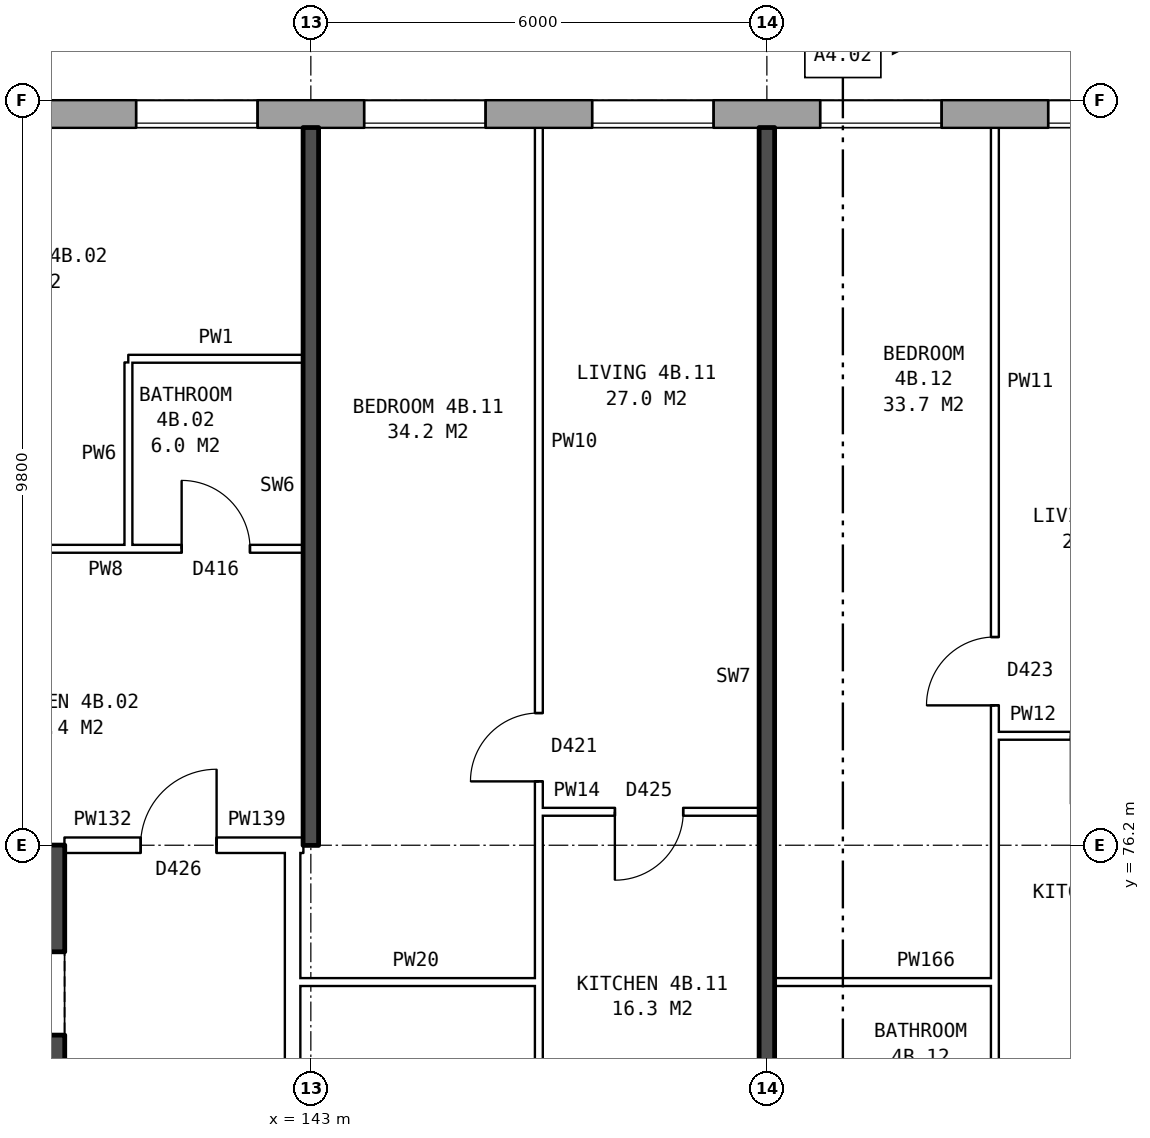
"""IFC4 building model, lengths in metres.
Left out: names, types, materials, properties, quantities, classifications, styles, units other than length and angle.
Written with IfcOpenShell. Run it as: python <this file> out.ifc"""

import sys

from ifc_helpers import new_model, si_unit, direction, frame, frame_2d, origin, place, context, subcontext, project, spatial, rectangle, extrude, element, fill, save


model = new_model("IFC4")
c1 = context("Model", 3, precision=1e-05, world=origin(), true_north=direction((0.0, 1.0)))
c2 = subcontext(c1, "Body", "Model", "MODEL_VIEW")
j1 = project(units=[si_unit("LENGTHUNIT", "METRE"), si_unit("PLANEANGLEUNIT", "RADIAN")], contexts=[c1])
p1 = place(None, origin())
s1 = spatial("IfcSite", under=j1, at=p1, CompositionType="ELEMENT")
p2 = place(p1, origin())
s2 = spatial("IfcBuilding", under=s1, at=p2, CompositionType="ELEMENT")
p3 = place(p2, frame((0.0, 0.0, 19.5)))
s3 = spatial("IfcBuildingStorey", under=s2, at=p3, CompositionType="ELEMENT", Elevation=19.5)
p4 = place(p3, frame((174.675, 85.82, 0.0), z_axis=(0.0, 0.0, 1.0), x_axis=(-1.0, 0.0, 0.0)))
e1 = element("IfcWall", 1, at=p4, inside=s3, PredefinedType="STANDARD", context=c2, shape_type="SweptSolid", body=[
    extrude(rectangle(XDim=40.601, YDim=0.36, at=frame_2d((20.3, 0.0))), origin(), (0.0, 0.0, 1.0), 2.85),
])
p5 = place(p4, frame((2.375, 0.0, 0.8)))
e2 = element("IfcOpeningElement", 2, at=p5, cuts=e1, PredefinedType="OPENING", context=c2, shape_type="SweptSolid", body=[
    extrude(rectangle(XDim=1.6, YDim=1.8, at=frame_2d((0.8, 0.9))), frame((0.0, 0.19, 0.0), z_axis=(0.0, -1.0, 0.0), x_axis=(1.0, 0.0, 0.0)), (0.0, 0.0, 1.0), 0.38),
])
p6 = place(p4, frame((5.375, 0.0, 0.8)))
e3 = element("IfcOpeningElement", 3, at=p6, cuts=e1, PredefinedType="OPENING", context=c2, shape_type="SweptSolid", body=[
    extrude(rectangle(XDim=1.6, YDim=1.8, at=frame_2d((0.8, 0.9))), frame((0.0, 0.19, 0.0), z_axis=(0.0, -1.0, 0.0), x_axis=(1.0, 0.0, 0.0)), (0.0, 0.0, 1.0), 0.38),
])
p7 = place(p4, frame((8.375, 0.0, 0.8)))
e4 = element("IfcOpeningElement", 4, at=p7, cuts=e1, PredefinedType="OPENING", context=c2, shape_type="SweptSolid", body=[
    extrude(rectangle(XDim=1.6, YDim=1.8, at=frame_2d((0.8, 0.9))), frame((0.0, 0.19, 0.0), z_axis=(0.0, -1.0, 0.0), x_axis=(1.0, 0.0, 0.0)), (0.0, 0.0, 1.0), 0.38),
])
p8 = place(p4, frame((11.375, 0.0, 0.8)))
e5 = element("IfcOpeningElement", 5, at=p8, cuts=e1, PredefinedType="OPENING", context=c2, shape_type="SweptSolid", body=[
    extrude(rectangle(XDim=1.6, YDim=1.8, at=frame_2d((0.8, 0.9))), frame((0.0, 0.19, 0.0), z_axis=(0.0, -1.0, 0.0), x_axis=(1.0, 0.0, 0.0)), (0.0, 0.0, 1.0), 0.38),
])
p9 = place(p4, frame((14.375, 0.0, 0.8)))
e6 = element("IfcOpeningElement", 6, at=p9, cuts=e1, PredefinedType="OPENING", context=c2, shape_type="SweptSolid", body=[
    extrude(rectangle(XDim=1.6, YDim=1.8, at=frame_2d((0.8, 0.9))), frame((0.0, 0.19, 0.0), z_axis=(0.0, -1.0, 0.0), x_axis=(1.0, 0.0, 0.0)), (0.0, 0.0, 1.0), 0.38),
])
p10 = place(p4, frame((17.375, 0.0, 0.8)))
e7 = element("IfcOpeningElement", 7, at=p10, cuts=e1, PredefinedType="OPENING", context=c2, shape_type="SweptSolid", body=[
    extrude(rectangle(XDim=1.6, YDim=1.8, at=frame_2d((0.8, 0.9))), frame((0.0, 0.19, 0.0), z_axis=(0.0, -1.0, 0.0), x_axis=(1.0, 0.0, 0.0)), (0.0, 0.0, 1.0), 0.38),
])
p11 = place(p4, frame((20.375, 0.0, 0.8)))
e8 = element("IfcOpeningElement", 8, at=p11, cuts=e1, PredefinedType="OPENING", context=c2, shape_type="SweptSolid", body=[
    extrude(rectangle(XDim=1.6, YDim=1.8, at=frame_2d((0.8, 0.9))), frame((0.0, 0.19, 0.0), z_axis=(0.0, -1.0, 0.0), x_axis=(1.0, 0.0, 0.0)), (0.0, 0.0, 1.0), 0.38),
])
p12 = place(p4, frame((23.375, 0.0, 0.8)))
e9 = element("IfcOpeningElement", 9, at=p12, cuts=e1, PredefinedType="OPENING", context=c2, shape_type="SweptSolid", body=[
    extrude(rectangle(XDim=1.6, YDim=1.8, at=frame_2d((0.8, 0.9))), frame((0.0, 0.19, 0.0), z_axis=(0.0, -1.0, 0.0), x_axis=(1.0, 0.0, 0.0)), (0.0, 0.0, 1.0), 0.38),
])
p13 = place(p4, frame((26.375, 0.0, 0.8)))
e10 = element("IfcOpeningElement", 10, at=p13, cuts=e1, PredefinedType="OPENING", context=c2, shape_type="SweptSolid", body=[
    extrude(rectangle(XDim=1.6, YDim=1.8, at=frame_2d((0.8, 0.9))), frame((0.0, 0.19, 0.0), z_axis=(0.0, -1.0, 0.0), x_axis=(1.0, 0.0, 0.0)), (0.0, 0.0, 1.0), 0.38),
])
p14 = place(p4, frame((29.375, 0.0, 0.8)))
e11 = element("IfcOpeningElement", 11, at=p14, cuts=e1, PredefinedType="OPENING", context=c2, shape_type="SweptSolid", body=[
    extrude(rectangle(XDim=1.6, YDim=1.8, at=frame_2d((0.8, 0.9))), frame((0.0, 0.19, 0.0), z_axis=(0.0, -1.0, 0.0), x_axis=(1.0, 0.0, 0.0)), (0.0, 0.0, 1.0), 0.38),
])
p15 = place(p4, frame((32.375, 0.0, 0.8)))
e12 = element("IfcOpeningElement", 12, at=p15, cuts=e1, PredefinedType="OPENING", context=c2, shape_type="SweptSolid", body=[
    extrude(rectangle(XDim=1.6, YDim=1.8, at=frame_2d((0.8, 0.9))), frame((0.0, 0.19, 0.0), z_axis=(0.0, -1.0, 0.0), x_axis=(1.0, 0.0, 0.0)), (0.0, 0.0, 1.0), 0.38),
])
p16 = place(p4, frame((35.375, 0.0, 0.8)))
e13 = element("IfcOpeningElement", 13, at=p16, cuts=e1, PredefinedType="OPENING", context=c2, shape_type="SweptSolid", body=[
    extrude(rectangle(XDim=1.6, YDim=1.8, at=frame_2d((0.8, 0.9))), frame((0.0, 0.19, 0.0), z_axis=(0.0, -1.0, 0.0), x_axis=(1.0, 0.0, 0.0)), (0.0, 0.0, 1.0), 0.38),
])
p17 = place(p4, frame((37.875, 0.0, 0.8)))
e14 = element("IfcOpeningElement", 14, at=p17, cuts=e1, PredefinedType="OPENING", context=c2, shape_type="SweptSolid", body=[
    extrude(rectangle(XDim=1.2, YDim=1.8, at=frame_2d((0.6, 0.9))), frame((0.0, 0.19, 0.0), z_axis=(0.0, -1.0, 0.0), x_axis=(1.0, 0.0, 0.0)), (0.0, 0.0, 1.0), 0.38),
])
p18 = place(p4, frame((39.375, 0.0, 0.8)))
e15 = element("IfcOpeningElement", 15, at=p18, cuts=e1, PredefinedType="OPENING", context=c2, shape_type="SweptSolid", body=[
    extrude(rectangle(XDim=0.6, YDim=1.2, at=frame_2d((0.3, 0.6))), frame((0.0, 0.19, 0.0), z_axis=(0.0, -1.0, 0.0), x_axis=(1.0, 0.0, 0.0)), (0.0, 0.0, 1.0), 0.38),
])
p19 = place(p3, frame((139.31, 64.7, 0.0), z_axis=(0.0, 0.0, 1.0), x_axis=(0.0, 1.0, 0.0)))
e16 = element("IfcWall", 16, at=p19, inside=s3, PredefinedType="SHEAR", context=c2, shape_type="SweptSolid", body=[
    extrude(rectangle(XDim=10.6, YDim=0.9, at=frame_2d((5.3, 0.0))), origin(), (0.0, 0.0, 1.0), 2.85),
])
p20 = place(p19, frame((0.425, 0.0, 0.0)))
e17 = element("IfcOpeningElement", 17, at=p20, cuts=e16, PredefinedType="OPENING", context=c2, shape_type="SweptSolid", body=[
    extrude(rectangle(XDim=1.1, YDim=2.1, at=frame_2d((0.55, 1.05))), frame((0.0, 0.46, 0.0), z_axis=(0.0, -1.0, 0.0), x_axis=(1.0, 0.0, 0.0)), (0.0, 0.0, 1.0), 0.92),
])
p21 = place(p19, frame((9.0, 0.0, 0.0)))
e18 = element("IfcOpeningElement", 18, at=p21, cuts=e16, PredefinedType="OPENING", context=c2, shape_type="SweptSolid", body=[
    extrude(rectangle(XDim=1.1, YDim=2.1, at=frame_2d((0.55, 1.05))), frame((0.0, 0.46, 0.0), z_axis=(0.0, -1.0, 0.0), x_axis=(1.0, 0.0, 0.0)), (0.0, 0.0, 1.0), 0.92),
])
p22 = place(p19, frame((7.225, 0.0, 0.0)))
e19 = element("IfcOpeningElement", 19, at=p22, cuts=e16, PredefinedType="OPENING", context=c2, shape_type="SweptSolid", body=[
    extrude(rectangle(XDim=0.85, YDim=2.1, at=frame_2d((0.425, 1.05))), frame((0.0, 0.46, 0.0), z_axis=(0.0, -1.0, 0.0), x_axis=(1.0, 0.0, 0.0)), (0.0, 0.0, 1.0), 0.92),
])
p23 = place(p3, frame((139.76, 75.75, 0.0), z_axis=(0.0, 0.0, 1.0), x_axis=(-1.0, 0.0, 0.0)))
e20 = element("IfcWall", 20, at=p23, inside=s3, PredefinedType="SHEAR", context=c2, shape_type="SweptSolid", body=[
    extrude(rectangle(XDim=8.4, YDim=0.9, at=frame_2d((4.2, 0.0))), origin(), (0.0, 0.0, 1.0), 2.85),
])
p24 = place(p3, frame((142.76, 63.9, 0.0), z_axis=(0.0, 0.0, 1.0), x_axis=(0.0, 1.0, 0.0)))
e21 = element("IfcWall", 21, at=p24, inside=s3, PredefinedType="PARTITIONING", context=c2, shape_type="SweptSolid", body=[
    extrude(rectangle(XDim=12.2, YDim=0.2, at=frame_2d((6.1, 0.0))), origin(), (0.0, 0.0, 1.0), 2.85),
])
p25 = place(p24, frame((5.1, 0.0, 0.0)))
e22 = element("IfcOpeningElement", 22, at=p25, cuts=e21, PredefinedType="OPENING", context=c2, shape_type="SweptSolid", body=[
    extrude(rectangle(XDim=2.0, YDim=2.1, at=frame_2d((1.0, 1.05))), frame((0.0, 0.11, 0.0), z_axis=(0.0, -1.0, 0.0), x_axis=(1.0, 0.0, 0.0)), (0.0, 0.0, 1.0), 0.22),
])
p26 = place(p3, frame((142.76, 74.4, 0.0), z_axis=(0.0, 0.0, 1.0), x_axis=(1.0, 0.0, 0.0)))
e23 = element("IfcWall", 23, at=p26, inside=s3, PredefinedType="PARTITIONING", context=c2, shape_type="SweptSolid", body=[
    extrude(rectangle(XDim=3.24, YDim=0.1, at=frame_2d((1.62, 0.0))), origin(), (0.0, 0.0, 1.0), 2.85),
])
p27 = place(p3, frame((149.1, 74.4, 0.0), z_axis=(0.0, 0.0, 1.0), x_axis=(1.0, 0.0, 0.0)))
e24 = element("IfcWall", 24, at=p27, inside=s3, PredefinedType="PARTITIONING", context=c2, shape_type="SweptSolid", body=[
    extrude(rectangle(XDim=2.9, YDim=0.1, at=frame_2d((1.45, 0.0))), origin(), (0.0, 0.0, 1.0), 2.85),
])
p28 = place(p3, frame((139.76, 76.2, 0.0), z_axis=(0.0, 0.0, 1.0), x_axis=(1.0, 0.0, 0.0)))
e25 = element("IfcWall", 25, at=p28, inside=s3, PredefinedType="PARTITIONING", context=c2, shape_type="SweptSolid", body=[
    extrude(rectangle(XDim=3.0, YDim=0.2, at=frame_2d((1.5, 0.0))), origin(), (0.0, 0.0, 1.0), 2.85),
])
p29 = place(p28, frame((1.0, 0.0, 0.0)))
e26 = element("IfcOpeningElement", 26, at=p29, cuts=e25, PredefinedType="OPENING", context=c2, shape_type="SweptSolid", body=[
    extrude(rectangle(XDim=1.0, YDim=2.1, at=frame_2d((0.5, 1.05))), frame((0.0, 0.11, 0.0), z_axis=(0.0, -1.0, 0.0), x_axis=(1.0, 0.0, 0.0)), (0.0, 0.0, 1.0), 0.22),
])
p30 = place(p3, frame((142.76, 76.2, 0.0), z_axis=(0.0, 0.0, 1.0), x_axis=(1.0, 0.0, 0.0)))
e27 = element("IfcWall", 27, at=p30, inside=s3, PredefinedType="PARTITIONING", context=c2, shape_type="SweptSolid", body=[
    extrude(rectangle(XDim=0.14, YDim=0.2, at=frame_2d((0.07, 0.0))), origin(), (0.0, 0.0, 1.0), 2.85),
])
p31 = place(p3, frame((146.0, 76.64, 0.0), z_axis=(0.0, 0.0, 1.0), x_axis=(1.0, 0.0, 0.0)))
e28 = element("IfcWall", 28, at=p31, inside=s3, PredefinedType="PARTITIONING", context=c2, shape_type="SweptSolid", body=[
    extrude(rectangle(XDim=2.9, YDim=0.1, at=frame_2d((1.45, 0.0))), origin(), (0.0, 0.0, 1.0), 2.85),
])
p32 = place(p31, frame((1.0, 0.0, 0.0)))
e29 = element("IfcOpeningElement", 29, at=p32, cuts=e28, PredefinedType="OPENING", context=c2, shape_type="SweptSolid", body=[
    extrude(rectangle(XDim=0.9, YDim=2.1, at=frame_2d((0.45, 1.05))), frame((0.0, 0.06, 0.0), z_axis=(0.0, -1.0, 0.0), x_axis=(1.0, 0.0, 0.0)), (0.0, 0.0, 1.0), 0.12),
])
p33 = place(p3, frame((152.0, 77.64, 0.0), z_axis=(0.0, 0.0, 1.0), x_axis=(1.0, 0.0, 0.0)))
e30 = element("IfcWall", 30, at=p33, inside=s3, PredefinedType="PARTITIONING", context=c2, shape_type="SweptSolid", body=[
    extrude(rectangle(XDim=2.9, YDim=0.1, at=frame_2d((1.45, 0.0))), origin(), (0.0, 0.0, 1.0), 2.85),
])
p34 = place(p33, frame((1.0, 0.0, 0.0)))
e31 = element("IfcOpeningElement", 31, at=p34, cuts=e30, PredefinedType="OPENING", context=c2, shape_type="SweptSolid", body=[
    extrude(rectangle(XDim=0.9, YDim=2.1, at=frame_2d((0.45, 1.05))), frame((0.0, 0.06, 0.0), z_axis=(0.0, -1.0, 0.0), x_axis=(1.0, 0.0, 0.0)), (0.0, 0.0, 1.0), 0.12),
])
p35 = place(p3, frame((137.1, 80.1, 0.0), z_axis=(0.0, 0.0, 1.0), x_axis=(1.0, 0.0, 0.0)))
e32 = element("IfcWall", 32, at=p35, inside=s3, PredefinedType="PARTITIONING", context=c2, shape_type="SweptSolid", body=[
    extrude(rectangle(XDim=5.8, YDim=0.1, at=frame_2d((2.9, 0.0))), origin(), (0.0, 0.0, 1.0), 2.85),
])
p36 = place(p35, frame((1.3, 0.0, 0.0)))
e33 = element("IfcOpeningElement", 33, at=p36, cuts=e32, PredefinedType="OPENING", context=c2, shape_type="SweptSolid", body=[
    extrude(rectangle(XDim=0.9, YDim=2.1, at=frame_2d((0.45, 1.05))), frame((0.0, 0.06, 0.0), z_axis=(0.0, -1.0, 0.0), x_axis=(1.0, 0.0, 0.0)), (0.0, 0.0, 1.0), 0.12),
])
p37 = place(p35, frame((4.2, 0.0, 0.0)))
e34 = element("IfcOpeningElement", 34, at=p37, cuts=e32, PredefinedType="OPENING", context=c2, shape_type="SweptSolid", body=[
    extrude(rectangle(XDim=0.9, YDim=2.1, at=frame_2d((0.45, 1.05))), frame((0.0, 0.06, 0.0), z_axis=(0.0, -1.0, 0.0), x_axis=(1.0, 0.0, 0.0)), (0.0, 0.0, 1.0), 0.12),
])
p38 = place(p3, frame((140.6, 82.6, 0.0), z_axis=(0.0, 0.0, 1.0), x_axis=(1.0, 0.0, 0.0)))
e35 = element("IfcWall", 35, at=p38, inside=s3, PredefinedType="PARTITIONING", context=c2, shape_type="SweptSolid", body=[
    extrude(rectangle(XDim=2.3, YDim=0.1, at=frame_2d((1.15, 0.0))), origin(), (0.0, 0.0, 1.0), 2.85),
])
p39 = place(p3, frame((140.6, 80.15, 0.0), z_axis=(0.0, 0.0, 1.0), x_axis=(0.0, 1.0, 0.0)))
e36 = element("IfcWall", 36, at=p39, inside=s3, PredefinedType="PARTITIONING", context=c2, shape_type="SweptSolid", body=[
    extrude(rectangle(XDim=2.4, YDim=0.1, at=frame_2d((1.2, 0.0))), origin(), (0.0, 0.0, 1.0), 2.85),
])
p40 = place(p3, frame((143.0, 76.2, 0.0), z_axis=(0.0, 0.0, 1.0), x_axis=(0.0, 1.0, 0.0)))
e37 = element("IfcWall", 37, at=p40, inside=s3, PredefinedType="SOLIDWALL", context=c2, shape_type="SweptSolid", body=[
    extrude(rectangle(XDim=9.44, YDim=0.2, at=frame_2d((4.72, 0.0))), origin(), (0.0, 0.0, 1.0), 2.85),
])
p41 = place(p3, frame((146.0, 71.3, 0.0), z_axis=(0.0, 0.0, 1.0), x_axis=(0.0, 1.0, 0.0)))
e38 = element("IfcWall", 38, at=p41, inside=s3, PredefinedType="PARTITIONING", context=c2, shape_type="SweptSolid", body=[
    extrude(rectangle(XDim=14.34, YDim=0.1, at=frame_2d((7.17, 0.0))), origin(), (0.0, 0.0, 1.0), 2.85),
])
p42 = place(p41, frame((5.74, 0.0, 0.0)))
e39 = element("IfcOpeningElement", 39, at=p42, cuts=e38, PredefinedType="OPENING", context=c2, shape_type="SweptSolid", body=[
    extrude(rectangle(XDim=0.9, YDim=2.1, at=frame_2d((0.45, 1.05))), frame((0.0, 0.06, 0.0), z_axis=(0.0, -1.0, 0.0), x_axis=(1.0, 0.0, 0.0)), (0.0, 0.0, 1.0), 0.12),
])
p43 = place(p41, frame((0.4, 0.0, 0.0)))
e40 = element("IfcOpeningElement", 40, at=p43, cuts=e38, PredefinedType="OPENING", context=c2, shape_type="SweptSolid", body=[
    extrude(rectangle(XDim=0.9, YDim=2.1, at=frame_2d((0.45, 1.05))), frame((0.0, 0.06, 0.0), z_axis=(0.0, -1.0, 0.0), x_axis=(1.0, 0.0, 0.0)), (0.0, 0.0, 1.0), 0.12),
])
p44 = place(p3, frame((149.0, 71.2, 0.0), z_axis=(0.0, 0.0, 1.0), x_axis=(0.0, 1.0, 0.0)))
e41 = element("IfcWall", 41, at=p44, inside=s3, PredefinedType="SOLIDWALL", context=c2, shape_type="SweptSolid", body=[
    extrude(rectangle(XDim=14.44, YDim=0.2, at=frame_2d((7.22, 0.0))), origin(), (0.0, 0.0, 1.0), 2.85),
])
p45 = place(p3, frame((152.0, 71.3, 0.0), z_axis=(0.0, 0.0, 1.0), x_axis=(0.0, 1.0, 0.0)))
e42 = element("IfcWall", 42, at=p45, inside=s3, PredefinedType="PARTITIONING", context=c2, shape_type="SweptSolid", body=[
    extrude(rectangle(XDim=14.34, YDim=0.1, at=frame_2d((7.17, 0.0))), origin(), (0.0, 0.0, 1.0), 2.85),
])
p46 = place(p45, frame((6.74, 0.0, 0.0)))
e43 = element("IfcOpeningElement", 43, at=p46, cuts=e42, PredefinedType="OPENING", context=c2, shape_type="SweptSolid", body=[
    extrude(rectangle(XDim=0.9, YDim=2.1, at=frame_2d((0.45, 1.05))), frame((0.0, 0.06, 0.0), z_axis=(0.0, -1.0, 0.0), x_axis=(1.0, 0.0, 0.0)), (0.0, 0.0, 1.0), 0.12),
])
p47 = place(p45, frame((0.4, 0.0, 0.0)))
e44 = element("IfcOpeningElement", 44, at=p47, cuts=e42, PredefinedType="OPENING", context=c2, shape_type="SweptSolid", body=[
    extrude(rectangle(XDim=0.9, YDim=2.1, at=frame_2d((0.45, 1.05))), frame((0.0, 0.06, 0.0), z_axis=(0.0, -1.0, 0.0), x_axis=(1.0, 0.0, 0.0)), (0.0, 0.0, 1.0), 0.12),
])
p48 = place(p11, origin())
e45 = element("IfcWindow", 45, at=p48, inside=s3, PartitioningType="SINGLE_PANEL", PredefinedType="WINDOW", context=c2, shape_type="SweptSolid", body=[
    extrude(rectangle(XDim=1.6, YDim=1.8, at=frame_2d((0.8, 0.9))), frame((0.0, 0.15, 0.0), z_axis=(0.0, -1.0, 0.0), x_axis=(1.0, 0.0, 0.0)), (0.0, 0.0, 1.0), 0.06),
])
fill(e8, e45)
p49 = place(p12, origin())
e46 = element("IfcWindow", 46, at=p49, inside=s3, PartitioningType="SINGLE_PANEL", PredefinedType="WINDOW", context=c2, shape_type="SweptSolid", body=[
    extrude(rectangle(XDim=1.6, YDim=1.8, at=frame_2d((0.8, 0.9))), frame((0.0, 0.15, 0.0), z_axis=(0.0, -1.0, 0.0), x_axis=(1.0, 0.0, 0.0)), (0.0, 0.0, 1.0), 0.06),
])
fill(e9, e46)
p50 = place(p13, origin())
e47 = element("IfcWindow", 47, at=p50, inside=s3, PartitioningType="SINGLE_PANEL", PredefinedType="WINDOW", context=c2, shape_type="SweptSolid", body=[
    extrude(rectangle(XDim=1.6, YDim=1.8, at=frame_2d((0.8, 0.9))), frame((0.0, 0.15, 0.0), z_axis=(0.0, -1.0, 0.0), x_axis=(1.0, 0.0, 0.0)), (0.0, 0.0, 1.0), 0.06),
])
fill(e10, e47)
p51 = place(p14, origin())
e48 = element("IfcWindow", 48, at=p51, inside=s3, PartitioningType="SINGLE_PANEL", PredefinedType="WINDOW", context=c2, shape_type="SweptSolid", body=[
    extrude(rectangle(XDim=1.6, YDim=1.8, at=frame_2d((0.8, 0.9))), frame((0.0, 0.15, 0.0), z_axis=(0.0, -1.0, 0.0), x_axis=(1.0, 0.0, 0.0)), (0.0, 0.0, 1.0), 0.06),
])
fill(e11, e48)
p52 = place(p15, origin())
e49 = element("IfcWindow", 49, at=p52, inside=s3, PartitioningType="SINGLE_PANEL", PredefinedType="WINDOW", context=c2, shape_type="SweptSolid", body=[
    extrude(rectangle(XDim=1.6, YDim=1.8, at=frame_2d((0.8, 0.9))), frame((0.0, 0.15, 0.0), z_axis=(0.0, -1.0, 0.0), x_axis=(1.0, 0.0, 0.0)), (0.0, 0.0, 1.0), 0.06),
])
fill(e12, e49)
p53 = place(p29, origin())
e50 = element("IfcDoor", 50, at=p53, inside=s3, OperationType="SINGLE_SWING_RIGHT", PredefinedType="DOOR", context=c2, shape_type="SweptSolid", body=[
    extrude(rectangle(XDim=1.0, YDim=2.1, at=frame_2d((0.5, 1.05))), frame((0.0, 0.025, 0.0), z_axis=(0.0, -1.0, 0.0), x_axis=(1.0, 0.0, 0.0)), (0.0, 0.0, 1.0), 0.05),
])
fill(e26, e50)
p54 = place(p37, origin())
e51 = element("IfcDoor", 51, at=p54, inside=s3, OperationType="SINGLE_SWING_LEFT", PredefinedType="DOOR", context=c2, shape_type="SweptSolid", body=[
    extrude(rectangle(XDim=0.9, YDim=2.1, at=frame_2d((0.45, 1.05))), frame((0.0, 0.025, 0.0), z_axis=(0.0, -1.0, 0.0), x_axis=(1.0, 0.0, 0.0)), (0.0, 0.0, 1.0), 0.05),
])
fill(e34, e51)
p55 = place(p42, origin())
e52 = element("IfcDoor", 52, at=p55, inside=s3, OperationType="SINGLE_SWING_LEFT", PredefinedType="DOOR", context=c2, shape_type="SweptSolid", body=[
    extrude(rectangle(XDim=0.9, YDim=2.1, at=frame_2d((0.45, 1.05))), frame((0.0, 0.025, 0.0), z_axis=(0.0, -1.0, 0.0), x_axis=(1.0, 0.0, 0.0)), (0.0, 0.0, 1.0), 0.05),
])
fill(e39, e52)
p56 = place(p32, frame((0.9, 0.0, 0.0), z_axis=(0.0, 0.0, 1.0), x_axis=(-1.0, 0.0, 0.0)))
e53 = element("IfcDoor", 53, at=p56, inside=s3, OperationType="SINGLE_SWING_RIGHT", PredefinedType="DOOR", context=c2, shape_type="SweptSolid", body=[
    extrude(rectangle(XDim=0.9, YDim=2.1, at=frame_2d((0.45, 1.05))), frame((0.0, 0.025, 0.0), z_axis=(0.0, -1.0, 0.0), x_axis=(1.0, 0.0, 0.0)), (0.0, 0.0, 1.0), 0.05),
])
fill(e29, e53)
p57 = place(p46, origin())
e54 = element("IfcDoor", 54, at=p57, inside=s3, OperationType="SINGLE_SWING_LEFT", PredefinedType="DOOR", context=c2, shape_type="SweptSolid", body=[
    extrude(rectangle(XDim=0.9, YDim=2.1, at=frame_2d((0.45, 1.05))), frame((0.0, 0.025, 0.0), z_axis=(0.0, -1.0, 0.0), x_axis=(1.0, 0.0, 0.0)), (0.0, 0.0, 1.0), 0.05),
])
fill(e43, e54)
save(model, sys.argv[1])
